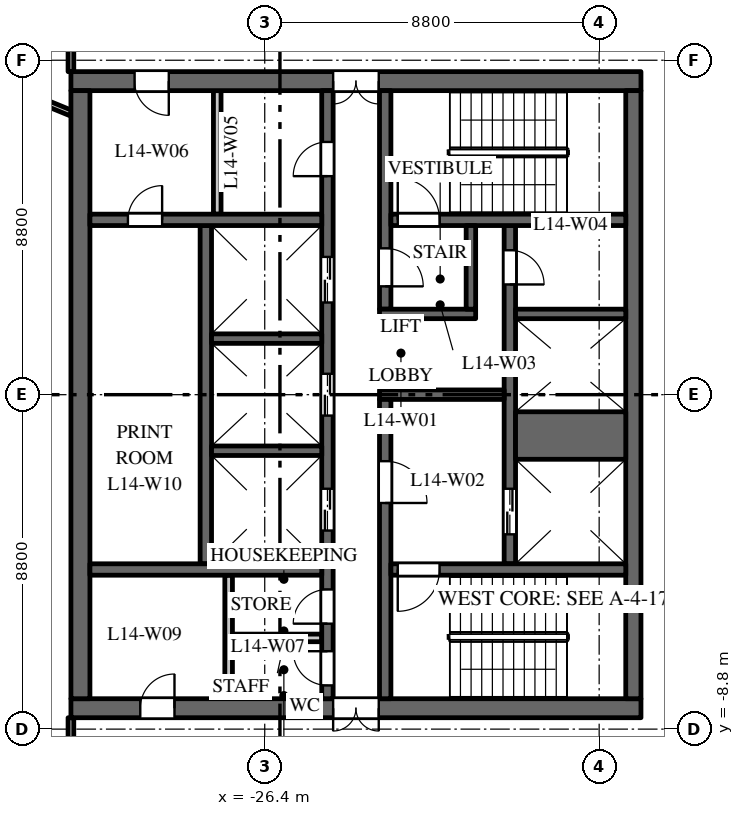
"""IFC4 building model, lengths in metres.
Left out: names, types, materials, properties, quantities, classifications, styles, units other than length and angle.
Written with IfcOpenShell. Run it as: python <this file> out.ifc"""

import sys

from ifc_helpers import new_model, si_unit, direction, frame, frame_2d, origin, place, context, subcontext, project, spatial, rectangle, extrude, element, fill, save


model = new_model("IFC4")
c1 = context("Model", 3, precision=1e-05, world=origin(), true_north=direction((0.0, 1.0)))
c2 = subcontext(c1, "Body", "Model", "MODEL_VIEW")
j1 = project(units=[si_unit("LENGTHUNIT", "METRE"), si_unit("PLANEANGLEUNIT", "RADIAN")], contexts=[c1])
p1 = place(None, origin())
s1 = spatial("IfcSite", under=j1, at=p1, CompositionType="ELEMENT")
p2 = place(p1, origin())
s2 = spatial("IfcBuilding", under=s1, at=p2, CompositionType="ELEMENT")
p3 = place(p2, frame((0.0, 0.0, 66.5)))
s3 = spatial("IfcBuildingStorey", under=s2, at=p3, CompositionType="ELEMENT", Elevation=66.5)
p4 = place(p3, frame((-16.5, 8.25, 0.0), z_axis=(0.0, 0.0, 1.0), x_axis=(-1.0, 0.0, 0.0)))
e1 = element("IfcWall", 1, at=p4, inside=s3, PredefinedType="SHEAR", context=c2, shape_type="SweptSolid", body=[
    extrude(rectangle(XDim=15.0, YDim=0.5, at=frame_2d((7.5, 0.0))), origin(), (0.0, 0.0, 1.0), 3.7),
])
p5 = place(p4, frame((6.9, 0.0, 0.0)))
e2 = element("IfcOpeningElement", 2, at=p5, cuts=e1, PredefinedType="OPENING", context=c2, shape_type="SweptSolid", body=[
    extrude(rectangle(XDim=1.2, YDim=2.1, at=frame_2d((0.6, 1.05))), frame((0.0, 0.26, 0.0), z_axis=(0.0, -1.0, 0.0), x_axis=(1.0, 0.0, 0.0)), (0.0, 0.0, 1.0), 0.52),
])
p6 = place(p4, frame((12.425, 0.0, 0.0)))
e3 = element("IfcOpeningElement", 3, at=p6, cuts=e1, PredefinedType="OPENING", context=c2, shape_type="SweptSolid", body=[
    extrude(rectangle(XDim=0.9, YDim=2.1, at=frame_2d((0.45, 1.05))), frame((0.0, 0.26, 0.0), z_axis=(0.0, -1.0, 0.0), x_axis=(1.0, 0.0, 0.0)), (0.0, 0.0, 1.0), 0.52),
])
p7 = place(p3, frame((-16.5, -8.25, 0.0), z_axis=(0.0, 0.0, 1.0), x_axis=(-1.0, 0.0, 0.0)))
e4 = element("IfcWall", 4, at=p7, inside=s3, PredefinedType="SHEAR", context=c2, shape_type="SweptSolid", body=[
    extrude(rectangle(XDim=15.0, YDim=0.5, at=frame_2d((7.5, 0.0))), origin(), (0.0, 0.0, 1.0), 3.7),
])
p8 = place(p7, frame((6.9, 0.0, 0.0)))
e5 = element("IfcOpeningElement", 5, at=p8, cuts=e4, PredefinedType="OPENING", context=c2, shape_type="SweptSolid", body=[
    extrude(rectangle(XDim=1.2, YDim=2.1, at=frame_2d((0.6, 1.05))), frame((0.0, 0.26, 0.0), z_axis=(0.0, -1.0, 0.0), x_axis=(1.0, 0.0, 0.0)), (0.0, 0.0, 1.0), 0.52),
])
p9 = place(p7, frame((12.275, 0.0, 0.0)))
e6 = element("IfcOpeningElement", 6, at=p9, cuts=e4, PredefinedType="OPENING", context=c2, shape_type="SweptSolid", body=[
    extrude(rectangle(XDim=0.9, YDim=2.1, at=frame_2d((0.45, 1.05))), frame((0.0, 0.26, 0.0), z_axis=(0.0, -1.0, 0.0), x_axis=(1.0, 0.0, 0.0)), (0.0, 0.0, 1.0), 0.52),
])
p10 = place(p3, frame((-27.95, -4.45, 0.0), z_axis=(0.0, 0.0, 1.0), x_axis=(0.0, 1.0, 0.0)))
e7 = element("IfcWall", 7, at=p10, inside=s3, PredefinedType="SHEAR", context=c2, shape_type="SweptSolid", body=[
    extrude(rectangle(XDim=8.9, YDim=0.3, at=frame_2d((4.45, 0.0))), origin(), (0.0, 0.0, 1.0), 3.7),
])
p11 = place(p3, frame((-19.95, -4.45, 0.0), z_axis=(0.0, 0.0, 1.0), x_axis=(0.0, 1.0, 0.0)))
e8 = element("IfcWall", 8, at=p11, inside=s3, PredefinedType="SHEAR", context=c2, shape_type="SweptSolid", body=[
    extrude(rectangle(XDim=8.9, YDim=0.3, at=frame_2d((4.45, 0.0))), origin(), (0.0, 0.0, 1.0), 3.7),
])
p12 = place(p11, frame((0.775, 0.0, 0.0)))
e9 = element("IfcOpeningElement", 9, at=p12, cuts=e8, PredefinedType="OPENING", context=c2, shape_type="SweptSolid", body=[
    extrude(rectangle(XDim=1.2, YDim=2.1, at=frame_2d((0.6, 1.05))), frame((0.0, 0.16, 0.0), z_axis=(0.0, -1.0, 0.0), x_axis=(1.0, 0.0, 0.0)), (0.0, 0.0, 1.0), 0.32),
])
p13 = place(p11, frame((7.35, 0.0, 0.0)))
e10 = element("IfcOpeningElement", 10, at=p13, cuts=e8, PredefinedType="OPENING", context=c2, shape_type="SweptSolid", body=[
    extrude(rectangle(XDim=0.9, YDim=2.1, at=frame_2d((0.45, 1.05))), frame((0.0, 0.16, 0.0), z_axis=(0.0, -1.0, 0.0), x_axis=(1.0, 0.0, 0.0)), (0.0, 0.0, 1.0), 0.32),
])
p14 = place(p3, frame((-24.75, -8.0, 0.0), z_axis=(0.0, 0.0, 1.0), x_axis=(0.0, 1.0, 0.0)))
e11 = element("IfcWall", 11, at=p14, inside=s3, PredefinedType="SHEAR", context=c2, shape_type="SweptSolid", body=[
    extrude(rectangle(XDim=16.0, YDim=0.3, at=frame_2d((8.0, 0.0))), origin(), (0.0, 0.0, 1.0), 3.7),
])
p15 = place(p14, frame((4.425, 0.0, 0.0)))
e12 = element("IfcOpeningElement", 12, at=p15, cuts=e11, PredefinedType="OPENING", context=c2, shape_type="SweptSolid", body=[
    extrude(rectangle(XDim=1.1, YDim=2.1, at=frame_2d((0.55, 1.05))), frame((0.0, 0.16, 0.0), z_axis=(0.0, -1.0, 0.0), x_axis=(1.0, 0.0, 0.0)), (0.0, 0.0, 1.0), 0.32),
])
p16 = place(p14, frame((7.45, 0.0, 0.0)))
e13 = element("IfcOpeningElement", 13, at=p16, cuts=e11, PredefinedType="OPENING", context=c2, shape_type="SweptSolid", body=[
    extrude(rectangle(XDim=1.1, YDim=2.1, at=frame_2d((0.55, 1.05))), frame((0.0, 0.16, 0.0), z_axis=(0.0, -1.0, 0.0), x_axis=(1.0, 0.0, 0.0)), (0.0, 0.0, 1.0), 0.32),
])
p17 = place(p14, frame((10.425, 0.0, 0.0)))
e14 = element("IfcOpeningElement", 14, at=p17, cuts=e11, PredefinedType="OPENING", context=c2, shape_type="SweptSolid", body=[
    extrude(rectangle(XDim=1.2, YDim=2.1, at=frame_2d((0.6, 1.05))), frame((0.0, 0.16, 0.0), z_axis=(0.0, -1.0, 0.0), x_axis=(1.0, 0.0, 0.0)), (0.0, 0.0, 1.0), 0.32),
])
p18 = place(p14, frame((13.75, 0.0, 0.0)))
e15 = element("IfcOpeningElement", 15, at=p18, cuts=e11, PredefinedType="OPENING", context=c2, shape_type="SweptSolid", body=[
    extrude(rectangle(XDim=0.9, YDim=2.1, at=frame_2d((0.45, 1.05))), frame((0.0, 0.16, 0.0), z_axis=(0.0, -1.0, 0.0), x_axis=(1.0, 0.0, 0.0)), (0.0, 0.0, 1.0), 0.32),
])
p19 = place(p14, frame((1.975, 0.0, 0.0)))
e16 = element("IfcOpeningElement", 16, at=p19, cuts=e11, PredefinedType="OPENING", context=c2, shape_type="SweptSolid", body=[
    extrude(rectangle(XDim=0.9, YDim=2.1, at=frame_2d((0.45, 1.05))), frame((0.0, 0.16, 0.0), z_axis=(0.0, -1.0, 0.0), x_axis=(1.0, 0.0, 0.0)), (0.0, 0.0, 1.0), 0.32),
])
p20 = place(p14, frame((0.35, 0.0, 0.0)))
e17 = element("IfcOpeningElement", 17, at=p20, cuts=e11, PredefinedType="OPENING", context=c2, shape_type="SweptSolid", body=[
    extrude(rectangle(XDim=0.9, YDim=2.1, at=frame_2d((0.45, 1.05))), frame((0.0, 0.16, 0.0), z_axis=(0.0, -1.0, 0.0), x_axis=(1.0, 0.0, 0.0)), (0.0, 0.0, 1.0), 0.32),
])
p21 = place(p3, frame((-20.1, 0.0, 0.0), z_axis=(0.0, 0.0, 1.0), x_axis=(-1.0, 0.0, 0.0)))
e18 = element("IfcWall", 18, at=p21, inside=s3, PredefinedType="SHEAR", context=c2, shape_type="SweptSolid", body=[
    extrude(rectangle(XDim=3.28, YDim=0.25, at=frame_2d((1.64, 0.0))), origin(), (0.0, 0.0, 1.0), 3.7),
])
p22 = place(p3, frame((-16.7, -8.0, 0.0), z_axis=(0.0, 0.0, 1.0), x_axis=(0.0, 1.0, 0.0)))
e19 = element("IfcWall", 19, at=p22, inside=s3, PredefinedType="SHEAR", context=c2, shape_type="SweptSolid", body=[
    extrude(rectangle(XDim=16.0, YDim=0.4, at=frame_2d((8.0, 0.0))), origin(), (0.0, 0.0, 1.0), 3.7),
])
p23 = place(p3, frame((-31.25, -8.0, 0.0), z_axis=(0.0, 0.0, 1.0), x_axis=(0.0, 1.0, 0.0)))
e20 = element("IfcWall", 20, at=p23, inside=s3, PredefinedType="SHEAR", context=c2, shape_type="SweptSolid", body=[
    extrude(rectangle(XDim=16.0, YDim=0.5, at=frame_2d((8.0, 0.0))), origin(), (0.0, 0.0, 1.0), 3.7),
])
p24 = place(p3, frame((-24.9, 4.6, 0.0), z_axis=(0.0, 0.0, 1.0), x_axis=(-1.0, 0.0, 0.0)))
e21 = element("IfcWall", 21, at=p24, inside=s3, PredefinedType="SHEAR", context=c2, shape_type="SweptSolid", body=[
    extrude(rectangle(XDim=6.1, YDim=0.3, at=frame_2d((3.05, 0.0))), origin(), (0.0, 0.0, 1.0), 3.7),
])
p25 = place(p24, frame((4.2, 0.0, 0.0)))
e22 = element("IfcOpeningElement", 22, at=p25, cuts=e21, PredefinedType="OPENING", context=c2, shape_type="SweptSolid", body=[
    extrude(rectangle(XDim=0.9, YDim=2.1, at=frame_2d((0.45, 1.05))), frame((0.0, 0.16, 0.0), z_axis=(0.0, -1.0, 0.0), x_axis=(1.0, 0.0, 0.0)), (0.0, 0.0, 1.0), 0.32),
])
for number, where, z_axis, x_axis in (
    (23, (-27.65, 4.75, 0.0), (0.0, 0.0, 1.0), (0.0, 1.0, 0.0)),
    (24, (-27.35, -8.0, 0.0), (0.0, 0.0, 1.0), (0.0, 1.0, 0.0)),
):
    element("IfcWall", number, at=place(p3, frame(where, z_axis=z_axis, x_axis=x_axis)), inside=s3, PredefinedType="PARTITIONING", context=c2, shape_type="SweptSolid", body=[
        extrude(rectangle(XDim=3.25, YDim=0.2, at=frame_2d((1.625, 0.0))), origin(), (0.0, 0.0, 1.0), 3.7),
    ])
p26 = place(p3, frame((-24.9, -6.4, 0.0), z_axis=(0.0, 0.0, 1.0), x_axis=(-1.0, 0.0, 0.0)))
e25 = element("IfcWall", 25, at=p26, inside=s3, PredefinedType="PARTITIONING", context=c2, shape_type="SweptSolid", body=[
    extrude(rectangle(XDim=2.35, YDim=0.2, at=frame_2d((1.175, 0.0))), origin(), (0.0, 0.0, 1.0), 3.7),
])
p27 = place(p3, frame((-24.9, -4.6, 0.0), z_axis=(0.0, 0.0, 1.0), x_axis=(-1.0, 0.0, 0.0)))
e26 = element("IfcWall", 26, at=p27, inside=s3, PredefinedType="SHEAR", context=c2, shape_type="SweptSolid", body=[
    extrude(rectangle(XDim=6.1, YDim=0.3, at=frame_2d((3.05, 0.0))), origin(), (0.0, 0.0, 1.0), 3.7),
])
p28 = place(p3, frame((-16.9, -1.075, 0.0), z_axis=(0.0, 0.0, 1.0), x_axis=(-1.0, 0.0, 0.0)))
e27 = element("IfcWall", 27, at=p28, inside=s3, PredefinedType="SHEAR", context=c2, shape_type="SweptSolid", body=[
    extrude(rectangle(XDim=2.9, YDim=1.25, at=frame_2d((1.45, 0.0))), origin(), (0.0, 0.0, 1.0), 3.7),
])
for number, where, z_axis, x_axis in (
    (28, (-16.9, 2.125, 0.0), (0.0, 0.0, 1.0), (-1.0, 0.0, 0.0)),
    (29, (-24.9, -1.475, 0.0), (0.0, 0.0, 1.0), (-1.0, 0.0, 0.0)),
    (30, (-24.9, 1.475, 0.0), (0.0, 0.0, 1.0), (-1.0, 0.0, 0.0)),
):
    element("IfcWall", number, at=place(p3, frame(where, z_axis=z_axis, x_axis=x_axis)), inside=s3, PredefinedType="SHEAR", context=c2, shape_type="SweptSolid", body=[
        extrude(rectangle(XDim=2.9, YDim=0.25, at=frame_2d((1.45, 0.0))), origin(), (0.0, 0.0, 1.0), 3.7),
    ])
p29 = place(p3, frame((-23.23, 2.25, 0.0), z_axis=(0.0, 0.0, 1.0), x_axis=(0.0, 1.0, 0.0)))
e31 = element("IfcWall", 31, at=p29, inside=s3, PredefinedType="SHEAR", context=c2, shape_type="SweptSolid", body=[
    extrude(rectangle(XDim=5.75, YDim=0.3, at=frame_2d((2.875, 0.0))), origin(), (0.0, 0.0, 1.0), 3.7),
])
p30 = place(p29, frame((0.6, 0.0, 0.0)))
e32 = element("IfcOpeningElement", 32, at=p30, cuts=e31, PredefinedType="OPENING", context=c2, shape_type="SweptSolid", body=[
    extrude(rectangle(XDim=1.0, YDim=2.1, at=frame_2d((0.5, 1.05))), frame((0.0, 0.16, 0.0), z_axis=(0.0, -1.0, 0.0), x_axis=(1.0, 0.0, 0.0)), (0.0, 0.0, 1.0), 0.32),
])
p31 = place(p3, frame((-23.23, -8.0, 0.0), z_axis=(0.0, 0.0, 1.0), x_axis=(0.0, 1.0, 0.0)))
e33 = element("IfcWall", 33, at=p31, inside=s3, PredefinedType="SHEAR", context=c2, shape_type="SweptSolid", body=[
    extrude(rectangle(XDim=7.875, YDim=0.3, at=frame_2d((3.938, 0.0))), origin(), (0.0, 0.0, 1.0), 3.7),
])
p32 = place(p31, frame((5.15, 0.0, 0.0)))
e34 = element("IfcOpeningElement", 34, at=p32, cuts=e33, PredefinedType="OPENING", context=c2, shape_type="SweptSolid", body=[
    extrude(rectangle(XDim=1.1, YDim=2.1, at=frame_2d((0.55, 1.05))), frame((0.0, 0.16, 0.0), z_axis=(0.0, -1.0, 0.0), x_axis=(1.0, 0.0, 0.0)), (0.0, 0.0, 1.0), 0.32),
])
p33 = place(p3, frame((-16.9, 4.6, 0.0), z_axis=(0.0, 0.0, 1.0), x_axis=(-1.0, 0.0, 0.0)))
e35 = element("IfcWall", 35, at=p33, inside=s3, PredefinedType="SHEAR", context=c2, shape_type="SweptSolid", body=[
    extrude(rectangle(XDim=6.18, YDim=0.3, at=frame_2d((3.09, 0.0))), origin(), (0.0, 0.0, 1.0), 3.7),
])
p34 = place(p33, frame((4.9, 0.0, 0.0)))
e36 = element("IfcOpeningElement", 36, at=p34, cuts=e35, PredefinedType="OPENING", context=c2, shape_type="SweptSolid", body=[
    extrude(rectangle(XDim=1.1, YDim=2.1, at=frame_2d((0.55, 1.05))), frame((0.0, 0.16, 0.0), z_axis=(0.0, -1.0, 0.0), x_axis=(1.0, 0.0, 0.0)), (0.0, 0.0, 1.0), 0.32),
])
p35 = place(p3, frame((-16.9, -4.6, 0.0), z_axis=(0.0, 0.0, 1.0), x_axis=(-1.0, 0.0, 0.0)))
e37 = element("IfcWall", 37, at=p35, inside=s3, PredefinedType="SHEAR", context=c2, shape_type="SweptSolid", body=[
    extrude(rectangle(XDim=6.18, YDim=0.3, at=frame_2d((3.09, 0.0))), origin(), (0.0, 0.0, 1.0), 3.7),
])
p36 = place(p35, frame((4.9, 0.0, 0.0)))
e38 = element("IfcOpeningElement", 38, at=p36, cuts=e37, PredefinedType="OPENING", context=c2, shape_type="SweptSolid", body=[
    extrude(rectangle(XDim=1.1, YDim=2.1, at=frame_2d((0.55, 1.05))), frame((0.0, 0.16, 0.0), z_axis=(0.0, -1.0, 0.0), x_axis=(1.0, 0.0, 0.0)), (0.0, 0.0, 1.0), 0.32),
])
p37 = place(p3, frame((-20.85, 2.125, 0.0), z_axis=(0.0, 0.0, 1.0), x_axis=(-1.0, 0.0, 0.0)))
e39 = element("IfcWall", 39, at=p37, inside=s3, PredefinedType="SHEAR", context=c2, shape_type="SweptSolid", body=[
    extrude(rectangle(XDim=2.53, YDim=0.25, at=frame_2d((1.265, 0.0))), origin(), (0.0, 0.0, 1.0), 3.7),
])
p38 = place(p3, frame((-20.975, 2.25, 0.0), z_axis=(0.0, 0.0, 1.0), x_axis=(0.0, 1.0, 0.0)))
e40 = element("IfcWall", 40, at=p38, inside=s3, PredefinedType="SHEAR", context=c2, shape_type="SweptSolid", body=[
    extrude(rectangle(XDim=2.2, YDim=0.25, at=frame_2d((1.1, 0.0))), origin(), (0.0, 0.0, 1.0), 3.7),
])
p39 = place(p3, frame((-34.234, 8.53, 0.0), z_axis=(0.0, 0.0, 1.0), x_axis=(0.925344112436, -0.379128307542, 0.0)))
e41 = element("IfcWall", 41, at=p39, inside=s3, PredefinedType="PARTITIONING", context=c2, shape_type="SweptSolid", body=[
    extrude(rectangle(XDim=2.954, YDim=0.15, at=frame_2d((1.477, 0.0))), origin(), (0.0, 0.0, 1.0), 2.85),
])
for number, where, z_axis, x_axis in (
    (42, (-31.5, -10.7, 0.0), (0.0, 0.0, 1.0), (0.0, 1.0, 0.0)),
    (43, (-31.5, 8.5, 0.0), (0.0, 0.0, 1.0), (0.0, 1.0, 0.0)),
):
    element("IfcWall", number, at=place(p3, frame(where, z_axis=z_axis, x_axis=x_axis)), inside=s3, PredefinedType="PARTITIONING", context=c2, shape_type="SweptSolid", body=[
        extrude(rectangle(XDim=2.2, YDim=0.15, at=frame_2d((1.1, 0.0))), origin(), (0.0, 0.0, 1.0), 3.7),
    ])
p40 = place(p12, origin())
e44 = element("IfcDoor", 44, at=p40, inside=s3, OperationType="DOUBLE_DOOR_SLIDING", PredefinedType="DOOR", context=c2, shape_type="SweptSolid", body=[
    extrude(rectangle(XDim=1.2, YDim=2.1, at=frame_2d((0.6, 1.05))), frame((0.0, 0.025, 0.0), z_axis=(0.0, -1.0, 0.0), x_axis=(1.0, 0.0, 0.0)), (0.0, 0.0, 1.0), 0.05),
])
fill(e9, e44)
p41 = place(p15, origin())
e45 = element("IfcDoor", 45, at=p41, inside=s3, OperationType="DOUBLE_DOOR_SLIDING", PredefinedType="DOOR", context=c2, shape_type="SweptSolid", body=[
    extrude(rectangle(XDim=1.1, YDim=2.1, at=frame_2d((0.55, 1.05))), frame((0.0, 0.025, 0.0), z_axis=(0.0, -1.0, 0.0), x_axis=(1.0, 0.0, 0.0)), (0.0, 0.0, 1.0), 0.05),
])
fill(e12, e45)
p42 = place(p16, origin())
e46 = element("IfcDoor", 46, at=p42, inside=s3, OperationType="DOUBLE_DOOR_SLIDING", PredefinedType="DOOR", context=c2, shape_type="SweptSolid", body=[
    extrude(rectangle(XDim=1.1, YDim=2.1, at=frame_2d((0.55, 1.05))), frame((0.0, 0.025, 0.0), z_axis=(0.0, -1.0, 0.0), x_axis=(1.0, 0.0, 0.0)), (0.0, 0.0, 1.0), 0.05),
])
fill(e13, e46)
p43 = place(p17, origin())
e47 = element("IfcDoor", 47, at=p43, inside=s3, OperationType="DOUBLE_DOOR_SLIDING", PredefinedType="DOOR", context=c2, shape_type="SweptSolid", body=[
    extrude(rectangle(XDim=1.2, YDim=2.1, at=frame_2d((0.6, 1.05))), frame((0.0, 0.025, 0.0), z_axis=(0.0, -1.0, 0.0), x_axis=(1.0, 0.0, 0.0)), (0.0, 0.0, 1.0), 0.05),
])
fill(e14, e47)
p44 = place(p34, origin())
e48 = element("IfcDoor", 48, at=p44, inside=s3, OperationType="SINGLE_SWING_RIGHT", PredefinedType="DOOR", context=c2, shape_type="SweptSolid", body=[
    extrude(rectangle(XDim=1.1, YDim=2.1, at=frame_2d((0.55, 1.05))), frame((0.0, 0.025, 0.0), z_axis=(0.0, -1.0, 0.0), x_axis=(1.0, 0.0, 0.0)), (0.0, 0.0, 1.0), 0.05),
])
fill(e36, e48)
p45 = place(p36, origin())
e49 = element("IfcDoor", 49, at=p45, inside=s3, OperationType="SINGLE_SWING_LEFT", PredefinedType="DOOR", context=c2, shape_type="SweptSolid", body=[
    extrude(rectangle(XDim=1.1, YDim=2.1, at=frame_2d((0.55, 1.05))), frame((0.0, 0.025, 0.0), z_axis=(0.0, -1.0, 0.0), x_axis=(1.0, 0.0, 0.0)), (0.0, 0.0, 1.0), 0.05),
])
fill(e38, e49)
p46 = place(p32, origin())
e50 = element("IfcDoor", 50, at=p46, inside=s3, OperationType="SINGLE_SWING_LEFT", PredefinedType="DOOR", context=c2, shape_type="SweptSolid", body=[
    extrude(rectangle(XDim=1.1, YDim=2.1, at=frame_2d((0.55, 1.05))), frame((0.0, 0.025, 0.0), z_axis=(0.0, -1.0, 0.0), x_axis=(1.0, 0.0, 0.0)), (0.0, 0.0, 1.0), 0.05),
])
fill(e34, e50)
p47 = place(p30, origin())
e51 = element("IfcDoor", 51, at=p47, inside=s3, OperationType="SINGLE_SWING_LEFT", PredefinedType="DOOR", context=c2, shape_type="SweptSolid", body=[
    extrude(rectangle(XDim=1.0, YDim=2.1, at=frame_2d((0.5, 1.05))), frame((0.0, 0.025, 0.0), z_axis=(0.0, -1.0, 0.0), x_axis=(1.0, 0.0, 0.0)), (0.0, 0.0, 1.0), 0.05),
])
fill(e32, e51)
p48 = place(p5, origin())
e52 = element("IfcDoor", 52, at=p48, inside=s3, OperationType="DOUBLE_DOOR_DOUBLE_SWING", PredefinedType="DOOR", context=c2, shape_type="SweptSolid", body=[
    extrude(rectangle(XDim=1.2, YDim=2.1, at=frame_2d((0.6, 1.05))), frame((0.0, 0.025, 0.0), z_axis=(0.0, -1.0, 0.0), x_axis=(1.0, 0.0, 0.0)), (0.0, 0.0, 1.0), 0.05),
])
fill(e2, e52)
p49 = place(p8, origin())
e53 = element("IfcDoor", 53, at=p49, inside=s3, OperationType="DOUBLE_DOOR_DOUBLE_SWING", PredefinedType="DOOR", context=c2, shape_type="SweptSolid", body=[
    extrude(rectangle(XDim=1.2, YDim=2.1, at=frame_2d((0.6, 1.05))), frame((0.0, 0.025, 0.0), z_axis=(0.0, -1.0, 0.0), x_axis=(1.0, 0.0, 0.0)), (0.0, 0.0, 1.0), 0.05),
])
fill(e5, e53)
p50 = place(p13, origin())
e54 = element("IfcDoor", 54, at=p50, inside=s3, OperationType="SINGLE_SWING_LEFT", PredefinedType="DOOR", context=c2, shape_type="SweptSolid", body=[
    extrude(rectangle(XDim=0.9, YDim=2.1, at=frame_2d((0.45, 1.05))), frame((0.0, 0.025, 0.0), z_axis=(0.0, -1.0, 0.0), x_axis=(1.0, 0.0, 0.0)), (0.0, 0.0, 1.0), 0.05),
])
fill(e10, e54)
p51 = place(p18, origin())
e55 = element("IfcDoor", 55, at=p51, inside=s3, OperationType="SINGLE_SWING_RIGHT", PredefinedType="DOOR", context=c2, shape_type="SweptSolid", body=[
    extrude(rectangle(XDim=0.9, YDim=2.1, at=frame_2d((0.45, 1.05))), frame((0.0, 0.025, 0.0), z_axis=(0.0, -1.0, 0.0), x_axis=(1.0, 0.0, 0.0)), (0.0, 0.0, 1.0), 0.05),
])
fill(e15, e55)
p52 = place(p6, origin())
e56 = element("IfcDoor", 56, at=p52, inside=s3, OperationType="SINGLE_SWING_RIGHT", PredefinedType="DOOR", context=c2, shape_type="SweptSolid", body=[
    extrude(rectangle(XDim=0.9, YDim=2.1, at=frame_2d((0.45, 1.05))), frame((0.0, 0.025, 0.0), z_axis=(0.0, -1.0, 0.0), x_axis=(1.0, 0.0, 0.0)), (0.0, 0.0, 1.0), 0.05),
])
fill(e3, e56)
p53 = place(p19, origin())
e57 = element("IfcDoor", 57, at=p53, inside=s3, OperationType="SINGLE_SWING_RIGHT", PredefinedType="DOOR", context=c2, shape_type="SweptSolid", body=[
    extrude(rectangle(XDim=0.9, YDim=2.1, at=frame_2d((0.45, 1.05))), frame((0.0, 0.025, 0.0), z_axis=(0.0, -1.0, 0.0), x_axis=(1.0, 0.0, 0.0)), (0.0, 0.0, 1.0), 0.05),
])
fill(e16, e57)
p54 = place(p20, origin())
e58 = element("IfcDoor", 58, at=p54, inside=s3, OperationType="SINGLE_SWING_LEFT", PredefinedType="DOOR", context=c2, shape_type="SweptSolid", body=[
    extrude(rectangle(XDim=0.9, YDim=2.1, at=frame_2d((0.45, 1.05))), frame((0.0, 0.025, 0.0), z_axis=(0.0, -1.0, 0.0), x_axis=(1.0, 0.0, 0.0)), (0.0, 0.0, 1.0), 0.05),
])
fill(e17, e58)
p55 = place(p9, origin())
e59 = element("IfcDoor", 59, at=p55, inside=s3, OperationType="SINGLE_SWING_LEFT", PredefinedType="DOOR", context=c2, shape_type="SweptSolid", body=[
    extrude(rectangle(XDim=0.9, YDim=2.1, at=frame_2d((0.45, 1.05))), frame((0.0, 0.025, 0.0), z_axis=(0.0, -1.0, 0.0), x_axis=(1.0, 0.0, 0.0)), (0.0, 0.0, 1.0), 0.05),
])
fill(e6, e59)
p56 = place(p25, origin())
e60 = element("IfcDoor", 60, at=p56, inside=s3, OperationType="SINGLE_SWING_LEFT", PredefinedType="DOOR", context=c2, shape_type="SweptSolid", body=[
    extrude(rectangle(XDim=0.9, YDim=2.1, at=frame_2d((0.45, 1.05))), frame((0.0, 0.025, 0.0), z_axis=(0.0, -1.0, 0.0), x_axis=(1.0, 0.0, 0.0)), (0.0, 0.0, 1.0), 0.05),
])
fill(e22, e60)
save(model, sys.argv[1])
